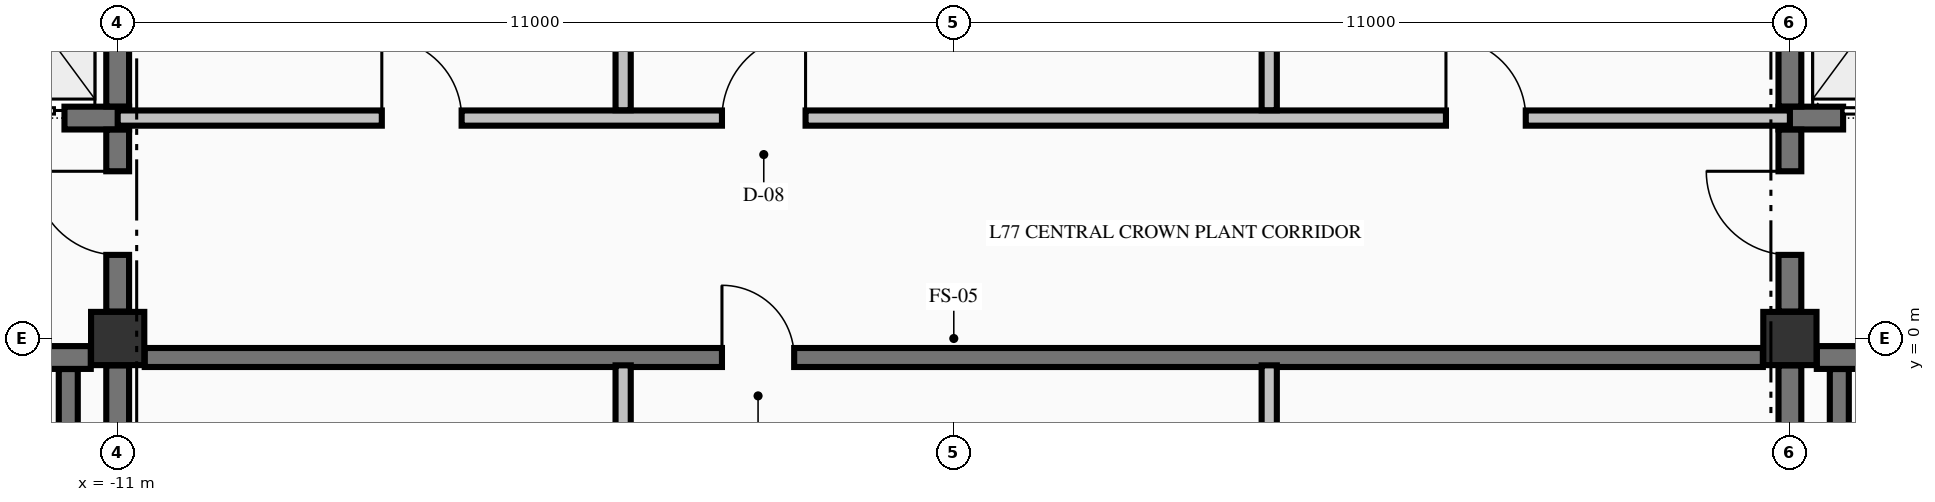
"""IFC4 building model, lengths in metres.
Left out: names, types, materials, properties, quantities, classifications, styles, units other than length and angle.
Written with IfcOpenShell. Run it as: python <this file> out.ifc"""

import sys

from ifc_helpers import new_model, si_unit, direction, frame, frame_2d, origin, origin_2d, place, context, subcontext, project, spatial, rectangle, extrude, element, fill, save


model = new_model("IFC4")
c1 = context("Model", 3, precision=1e-05, world=origin(), true_north=direction((0.0, 1.0)))
c2 = subcontext(c1, "Body", "Model", "MODEL_VIEW")
j1 = project(units=[si_unit("LENGTHUNIT", "METRE"), si_unit("PLANEANGLEUNIT", "RADIAN")], contexts=[c1])
p1 = place(None, origin())
s1 = spatial("IfcSite", under=j1, at=p1, CompositionType="ELEMENT")
p2 = place(p1, origin())
s2 = spatial("IfcBuilding", under=s1, at=p2, CompositionType="ELEMENT")
p3 = place(p2, frame((0.0, 0.0, 287.92)))
s3 = spatial("IfcBuildingStorey", under=s2, at=p3, CompositionType="ELEMENT", Elevation=287.92)
for number, where, z_axis, x_axis in (
    (1, (-11.0, 0.0, -0.325), (0.0, 0.0, 1.0), (1.0, 0.0, 0.0)),
    (2, (11.0, 0.0, -0.325), (0.0, 0.0, 1.0), (1.0, 0.0, 0.0)),
):
    element("IfcColumn", number, at=place(p3, frame(where, z_axis=z_axis, x_axis=x_axis)), inside=s3, PredefinedType="COLUMN", context=c2, shape_type="SweptSolid", body=[
        extrude(rectangle(XDim=0.7, YDim=0.7, at=origin_2d()), origin(), (0.0, 0.0, 1.0), 3.06),
    ])
p4 = place(p3, frame((-14.85, -0.25, 0.0), z_axis=(0.0, 0.0, 1.0), x_axis=(1.0, 0.0, 0.0)))
e3 = element("IfcWall", 3, at=p4, inside=s3, PredefinedType="SHEAR", context=c2, shape_type="SweptSolid", body=[
    extrude(rectangle(XDim=3.496, YDim=0.3, at=frame_2d((1.748, 0.0))), origin(), (0.0, 0.0, 1.0), 2.735),
])
p5 = place(p4, frame((1.15, 0.0, 0.0)))
e4 = element("IfcOpeningElement", 4, at=p5, cuts=e3, PredefinedType="OPENING", context=c2, shape_type="SweptSolid", body=[
    extrude(rectangle(XDim=1.1, YDim=2.15, at=frame_2d((0.55, 1.075))), frame((0.0, 0.16, 0.0), z_axis=(0.0, -1.0, 0.0), x_axis=(1.0, 0.0, 0.0)), (0.0, 0.0, 1.0), 0.32),
])
p6 = place(p3, frame((11.354, -0.25, 0.0), z_axis=(0.0, 0.0, 1.0), x_axis=(1.0, 0.0, 0.0)))
e5 = element("IfcWall", 5, at=p6, inside=s3, PredefinedType="SHEAR", context=c2, shape_type="SweptSolid", body=[
    extrude(rectangle(XDim=3.496, YDim=0.3, at=frame_2d((1.748, 0.0))), origin(), (0.0, 0.0, 1.0), 2.735),
])
p7 = place(p6, frame((1.246, 0.0, 0.0)))
e6 = element("IfcOpeningElement", 6, at=p7, cuts=e5, PredefinedType="OPENING", context=c2, shape_type="SweptSolid", body=[
    extrude(rectangle(XDim=1.1, YDim=2.15, at=frame_2d((0.55, 1.075))), frame((0.0, 0.16, 0.0), z_axis=(0.0, -1.0, 0.0), x_axis=(1.0, 0.0, 0.0)), (0.0, 0.0, 1.0), 0.32),
])
p8 = place(p3, frame((-14.85, 2.9, 0.0), z_axis=(0.0, 0.0, 1.0), x_axis=(1.0, 0.0, 0.0)))
e7 = element("IfcWall", 7, at=p8, inside=s3, PredefinedType="SHEAR", context=c2, shape_type="SweptSolid", body=[
    extrude(rectangle(XDim=4.0, YDim=0.3, at=frame_2d((2.0, 0.0))), origin(), (0.0, 0.0, 1.0), 2.735),
])
p9 = place(p8, frame((2.05, 0.0, 0.0)))
e8 = element("IfcOpeningElement", 8, at=p9, cuts=e7, PredefinedType="OPENING", context=c2, shape_type="SweptSolid", body=[
    extrude(rectangle(XDim=1.1, YDim=2.2, at=frame_2d((0.55, 1.1))), frame((0.0, 0.16, 0.0), z_axis=(0.0, -1.0, 0.0), x_axis=(1.0, 0.0, 0.0)), (0.0, 0.0, 1.0), 0.32),
])
p10 = place(p3, frame((10.85, 2.9, 0.0), z_axis=(0.0, 0.0, 1.0), x_axis=(1.0, 0.0, 0.0)))
e9 = element("IfcWall", 9, at=p10, inside=s3, PredefinedType="SHEAR", context=c2, shape_type="SweptSolid", body=[
    extrude(rectangle(XDim=4.0, YDim=0.3, at=frame_2d((2.0, 0.0))), origin(), (0.0, 0.0, 1.0), 2.735),
])
p11 = place(p10, frame((0.85, 0.0, 0.0)))
e10 = element("IfcOpeningElement", 10, at=p11, cuts=e9, PredefinedType="OPENING", context=c2, shape_type="SweptSolid", body=[
    extrude(rectangle(XDim=1.1, YDim=2.2, at=frame_2d((0.55, 1.1))), frame((0.0, 0.16, 0.0), z_axis=(0.0, -1.0, 0.0), x_axis=(1.0, 0.0, 0.0)), (0.0, 0.0, 1.0), 0.32),
])
p12 = place(p3, frame((-10.644, -0.25, 0.0), z_axis=(0.0, 0.0, 1.0), x_axis=(1.0, 0.0, 0.0)))
e11 = element("IfcWall", 11, at=p12, inside=s3, PredefinedType="SOLIDWALL", context=c2, shape_type="SweptSolid", body=[
    extrude(rectangle(XDim=21.288, YDim=0.25, at=frame_2d((10.644, 0.0))), origin(), (0.0, 0.0, 1.0), 2.735),
])
p13 = place(p12, frame((7.594, 0.0, 0.0)))
e12 = element("IfcOpeningElement", 12, at=p13, cuts=e11, PredefinedType="OPENING", context=c2, shape_type="SweptSolid", body=[
    extrude(rectangle(XDim=0.95, YDim=2.02, at=frame_2d((0.475, 1.01))), frame((0.0, 0.135, 0.0), z_axis=(0.0, -1.0, 0.0), x_axis=(1.0, 0.0, 0.0)), (0.0, 0.0, 1.0), 0.27),
])
p14 = place(p3, frame((-11.0, 2.9, 0.0), z_axis=(0.0, 0.0, 1.0), x_axis=(1.0, 0.0, 0.0)))
e13 = element("IfcWall", 13, at=p14, inside=s3, PredefinedType="PARTITIONING", context=c2, shape_type="SweptSolid", body=[
    extrude(rectangle(XDim=22.0, YDim=0.2, at=frame_2d((11.0, 0.0))), origin(), (0.0, 0.0, 1.0), 2.735),
])
p15 = place(p14, frame((7.95, 0.0, 0.0)))
e14 = element("IfcOpeningElement", 14, at=p15, cuts=e13, PredefinedType="OPENING", context=c2, shape_type="SweptSolid", body=[
    extrude(rectangle(XDim=1.1, YDim=2.15, at=frame_2d((0.55, 1.075))), frame((0.0, 0.11, 0.0), z_axis=(0.0, -1.0, 0.0), x_axis=(1.0, 0.0, 0.0)), (0.0, 0.0, 1.0), 0.22),
])
p16 = place(p14, frame((17.475, 0.0, 0.0)))
e15 = element("IfcOpeningElement", 15, at=p16, cuts=e13, PredefinedType="OPENING", context=c2, shape_type="SweptSolid", body=[
    extrude(rectangle(XDim=1.05, YDim=2.15, at=frame_2d((0.525, 1.075))), frame((0.0, 0.11, 0.0), z_axis=(0.0, -1.0, 0.0), x_axis=(1.0, 0.0, 0.0)), (0.0, 0.0, 1.0), 0.22),
])
p17 = place(p14, frame((3.475, 0.0, 0.0)))
e16 = element("IfcOpeningElement", 16, at=p17, cuts=e13, PredefinedType="OPENING", context=c2, shape_type="SweptSolid", body=[
    extrude(rectangle(XDim=1.05, YDim=2.15, at=frame_2d((0.525, 1.075))), frame((0.0, 0.11, 0.0), z_axis=(0.0, -1.0, 0.0), x_axis=(1.0, 0.0, 0.0)), (0.0, 0.0, 1.0), 0.22),
])
p18 = place(p3, frame((-11.65, -9.798, 0.0), z_axis=(0.0, 0.0, 1.0), x_axis=(0.0, 1.0, 0.0)))
e17 = element("IfcWall", 17, at=p18, inside=s3, PredefinedType="SOLIDWALL", context=c2, shape_type="SweptSolid", body=[
    extrude(rectangle(XDim=9.396, YDim=0.25, at=frame_2d((4.698, 0.0))), origin(), (0.0, 0.0, 1.0), 2.735),
])
p19 = place(p3, frame((-11.0, -9.798, 0.0), z_axis=(0.0, 0.0, 1.0), x_axis=(0.0, 1.0, 0.0)))
e18 = element("IfcWall", 18, at=p19, inside=s3, PredefinedType="SHEAR", context=c2, shape_type="SweptSolid", body=[
    extrude(rectangle(XDim=9.444, YDim=0.3, at=frame_2d((4.722, 0.0))), origin(), (0.0, 0.0, 1.0), 2.735),
])
p20 = place(p3, frame((-11.0, 0.354, 0.0), z_axis=(0.0, 0.0, 1.0), x_axis=(0.0, 1.0, 0.0)))
e19 = element("IfcWall", 19, at=p20, inside=s3, PredefinedType="SHEAR", context=c2, shape_type="SweptSolid", body=[
    extrude(rectangle(XDim=2.394, YDim=0.3, at=frame_2d((1.197, 0.0))), origin(), (0.0, 0.0, 1.0), 2.735),
])
p21 = place(p20, frame((0.746, 0.0, 0.0)))
e20 = element("IfcOpeningElement", 20, at=p21, cuts=e19, PredefinedType="OPENING", context=c2, shape_type="SweptSolid", body=[
    extrude(rectangle(XDim=1.1, YDim=2.15, at=frame_2d((0.55, 1.075))), frame((0.0, 0.16, 0.0), z_axis=(0.0, -1.0, 0.0), x_axis=(1.0, 0.0, 0.0)), (0.0, 0.0, 1.0), 0.32),
])
p22 = place(p3, frame((-11.0, 3.052, 0.0), z_axis=(0.0, 0.0, 1.0), x_axis=(0.0, 1.0, 0.0)))
e21 = element("IfcWall", 21, at=p22, inside=s3, PredefinedType="SHEAR", context=c2, shape_type="SweptSolid", body=[
    extrude(rectangle(XDim=2.496, YDim=0.3, at=frame_2d((1.248, 0.0))), origin(), (0.0, 0.0, 1.0), 2.735),
])
p23 = place(p3, frame((11.0, -9.798, 0.0), z_axis=(0.0, 0.0, 1.0), x_axis=(0.0, 1.0, 0.0)))
e22 = element("IfcWall", 22, at=p23, inside=s3, PredefinedType="SHEAR", context=c2, shape_type="SweptSolid", body=[
    extrude(rectangle(XDim=9.444, YDim=0.3, at=frame_2d((4.722, 0.0))), origin(), (0.0, 0.0, 1.0), 2.735),
])
p24 = place(p3, frame((11.0, 0.354, 0.0), z_axis=(0.0, 0.0, 1.0), x_axis=(0.0, 1.0, 0.0)))
e23 = element("IfcWall", 23, at=p24, inside=s3, PredefinedType="SHEAR", context=c2, shape_type="SweptSolid", body=[
    extrude(rectangle(XDim=2.394, YDim=0.3, at=frame_2d((1.197, 0.0))), origin(), (0.0, 0.0, 1.0), 2.735),
])
p25 = place(p24, frame((0.746, 0.0, 0.0)))
e24 = element("IfcOpeningElement", 24, at=p25, cuts=e23, PredefinedType="OPENING", context=c2, shape_type="SweptSolid", body=[
    extrude(rectangle(XDim=1.1, YDim=2.15, at=frame_2d((0.55, 1.075))), frame((0.0, 0.16, 0.0), z_axis=(0.0, -1.0, 0.0), x_axis=(1.0, 0.0, 0.0)), (0.0, 0.0, 1.0), 0.32),
])
p26 = place(p3, frame((11.0, 3.052, 0.0), z_axis=(0.0, 0.0, 1.0), x_axis=(0.0, 1.0, 0.0)))
e25 = element("IfcWall", 25, at=p26, inside=s3, PredefinedType="SHEAR", context=c2, shape_type="SweptSolid", body=[
    extrude(rectangle(XDim=2.496, YDim=0.3, at=frame_2d((1.248, 0.0))), origin(), (0.0, 0.0, 1.0), 2.735),
])
p27 = place(p3, frame((11.65, -9.798, 0.0), z_axis=(0.0, 0.0, 1.0), x_axis=(0.0, 1.0, 0.0)))
e26 = element("IfcWall", 26, at=p27, inside=s3, PredefinedType="SOLIDWALL", context=c2, shape_type="SweptSolid", body=[
    extrude(rectangle(XDim=9.396, YDim=0.25, at=frame_2d((4.698, 0.0))), origin(), (0.0, 0.0, 1.0), 2.735),
])
p28 = place(p3, frame((-4.35, -6.172, 0.0), z_axis=(0.0, 0.0, 1.0), x_axis=(0.0, 1.0, 0.0)))
e27 = element("IfcWall", 27, at=p28, inside=s3, PredefinedType="PARTITIONING", context=c2, shape_type="SweptSolid", body=[
    extrude(rectangle(XDim=5.819, YDim=0.2, at=frame_2d((2.91, 0.0))), origin(), (0.0, 0.0, 1.0), 2.735),
])
p29 = place(p28, frame((2.447, 0.0, 0.0)))
e28 = element("IfcOpeningElement", 28, at=p29, cuts=e27, PredefinedType="OPENING", context=c2, shape_type="SweptSolid", body=[
    extrude(rectangle(XDim=1.05, YDim=2.15, at=frame_2d((0.525, 1.075))), frame((0.0, 0.11, 0.0), z_axis=(0.0, -1.0, 0.0), x_axis=(1.0, 0.0, 0.0)), (0.0, 0.0, 1.0), 0.22),
])
p30 = place(p3, frame((-4.35, 3.003, 0.0), z_axis=(0.0, 0.0, 1.0), x_axis=(0.0, 1.0, 0.0)))
e29 = element("IfcWall", 29, at=p30, inside=s3, PredefinedType="PARTITIONING", context=c2, shape_type="SweptSolid", body=[
    extrude(rectangle(XDim=3.169, YDim=0.2, at=frame_2d((1.584, 0.0))), origin(), (0.0, 0.0, 1.0), 2.735),
])
p31 = place(p3, frame((4.15, -6.172, 0.0), z_axis=(0.0, 0.0, 1.0), x_axis=(0.0, 1.0, 0.0)))
e30 = element("IfcWall", 30, at=p31, inside=s3, PredefinedType="PARTITIONING", context=c2, shape_type="SweptSolid", body=[
    extrude(rectangle(XDim=5.819, YDim=0.2, at=frame_2d((2.91, 0.0))), origin(), (0.0, 0.0, 1.0), 2.735),
])
p32 = place(p31, frame((2.447, 0.0, 0.0)))
e31 = element("IfcOpeningElement", 31, at=p32, cuts=e30, PredefinedType="OPENING", context=c2, shape_type="SweptSolid", body=[
    extrude(rectangle(XDim=1.05, YDim=2.15, at=frame_2d((0.525, 1.075))), frame((0.0, 0.11, 0.0), z_axis=(0.0, -1.0, 0.0), x_axis=(1.0, 0.0, 0.0)), (0.0, 0.0, 1.0), 0.22),
])
p33 = place(p3, frame((4.15, 3.003, 0.0), z_axis=(0.0, 0.0, 1.0), x_axis=(0.0, 1.0, 0.0)))
e32 = element("IfcWall", 32, at=p33, inside=s3, PredefinedType="PARTITIONING", context=c2, shape_type="SweptSolid", body=[
    extrude(rectangle(XDim=3.169, YDim=0.2, at=frame_2d((1.584, 0.0))), origin(), (0.0, 0.0, 1.0), 2.735),
])
p34 = place(p21, origin())
e33 = element("IfcDoor", 33, at=p34, inside=s3, OperationType="SINGLE_SWING_RIGHT", PredefinedType="DOOR", context=c2, shape_type="SweptSolid", body=[
    extrude(rectangle(XDim=1.1, YDim=2.15, at=frame_2d((0.55, 1.075))), frame((0.0, 0.025, 0.0), z_axis=(0.0, -1.0, 0.0), x_axis=(1.0, 0.0, 0.0)), (0.0, 0.0, 1.0), 0.05),
])
fill(e20, e33)
p35 = place(p9, origin())
e34 = element("IfcDoor", 34, at=p35, inside=s3, OperationType="SLIDING_TO_LEFT", PredefinedType="DOOR", context=c2, shape_type="SweptSolid", body=[
    extrude(rectangle(XDim=1.1, YDim=2.2, at=frame_2d((0.55, 1.1))), frame((0.0, 0.025, 0.0), z_axis=(0.0, -1.0, 0.0), x_axis=(1.0, 0.0, 0.0)), (0.0, 0.0, 1.0), 0.05),
])
fill(e8, e34)
p36 = place(p25, origin())
e35 = element("IfcDoor", 35, at=p36, inside=s3, OperationType="SINGLE_SWING_RIGHT", PredefinedType="DOOR", context=c2, shape_type="SweptSolid", body=[
    extrude(rectangle(XDim=1.1, YDim=2.15, at=frame_2d((0.55, 1.075))), frame((0.0, 0.025, 0.0), z_axis=(0.0, -1.0, 0.0), x_axis=(1.0, 0.0, 0.0)), (0.0, 0.0, 1.0), 0.05),
])
fill(e24, e35)
p37 = place(p11, origin())
e36 = element("IfcDoor", 36, at=p37, inside=s3, OperationType="SLIDING_TO_RIGHT", PredefinedType="DOOR", context=c2, shape_type="SweptSolid", body=[
    extrude(rectangle(XDim=1.1, YDim=2.2, at=frame_2d((0.55, 1.1))), frame((0.0, 0.025, 0.0), z_axis=(0.0, -1.0, 0.0), x_axis=(1.0, 0.0, 0.0)), (0.0, 0.0, 1.0), 0.05),
])
fill(e10, e36)
p38 = place(p13, origin())
e37 = element("IfcDoor", 37, at=p38, inside=s3, OperationType="SINGLE_SWING_LEFT", PredefinedType="DOOR", context=c2, shape_type="SweptSolid", body=[
    extrude(rectangle(XDim=0.95, YDim=2.02, at=frame_2d((0.475, 1.01))), frame((0.0, 0.025, 0.0), z_axis=(0.0, -1.0, 0.0), x_axis=(1.0, 0.0, 0.0)), (0.0, 0.0, 1.0), 0.05),
])
fill(e12, e37)
p39 = place(p15, origin())
e38 = element("IfcDoor", 38, at=p39, inside=s3, OperationType="SINGLE_SWING_RIGHT", PredefinedType="DOOR", context=c2, shape_type="SweptSolid", body=[
    extrude(rectangle(XDim=1.1, YDim=2.15, at=frame_2d((0.55, 1.075))), frame((0.0, 0.025, 0.0), z_axis=(0.0, -1.0, 0.0), x_axis=(1.0, 0.0, 0.0)), (0.0, 0.0, 1.0), 0.05),
])
fill(e14, e38)
p40 = place(p16, origin())
e39 = element("IfcDoor", 39, at=p40, inside=s3, OperationType="SINGLE_SWING_LEFT", PredefinedType="DOOR", context=c2, shape_type="SweptSolid", body=[
    extrude(rectangle(XDim=1.05, YDim=2.15, at=frame_2d((0.525, 1.075))), frame((0.0, 0.025, 0.0), z_axis=(0.0, -1.0, 0.0), x_axis=(1.0, 0.0, 0.0)), (0.0, 0.0, 1.0), 0.05),
])
fill(e15, e39)
p41 = place(p17, origin())
e40 = element("IfcDoor", 40, at=p41, inside=s3, OperationType="SINGLE_SWING_LEFT", PredefinedType="DOOR", context=c2, shape_type="SweptSolid", body=[
    extrude(rectangle(XDim=1.05, YDim=2.15, at=frame_2d((0.525, 1.075))), frame((0.0, 0.025, 0.0), z_axis=(0.0, -1.0, 0.0), x_axis=(1.0, 0.0, 0.0)), (0.0, 0.0, 1.0), 0.05),
])
fill(e16, e40)
save(model, sys.argv[1])
